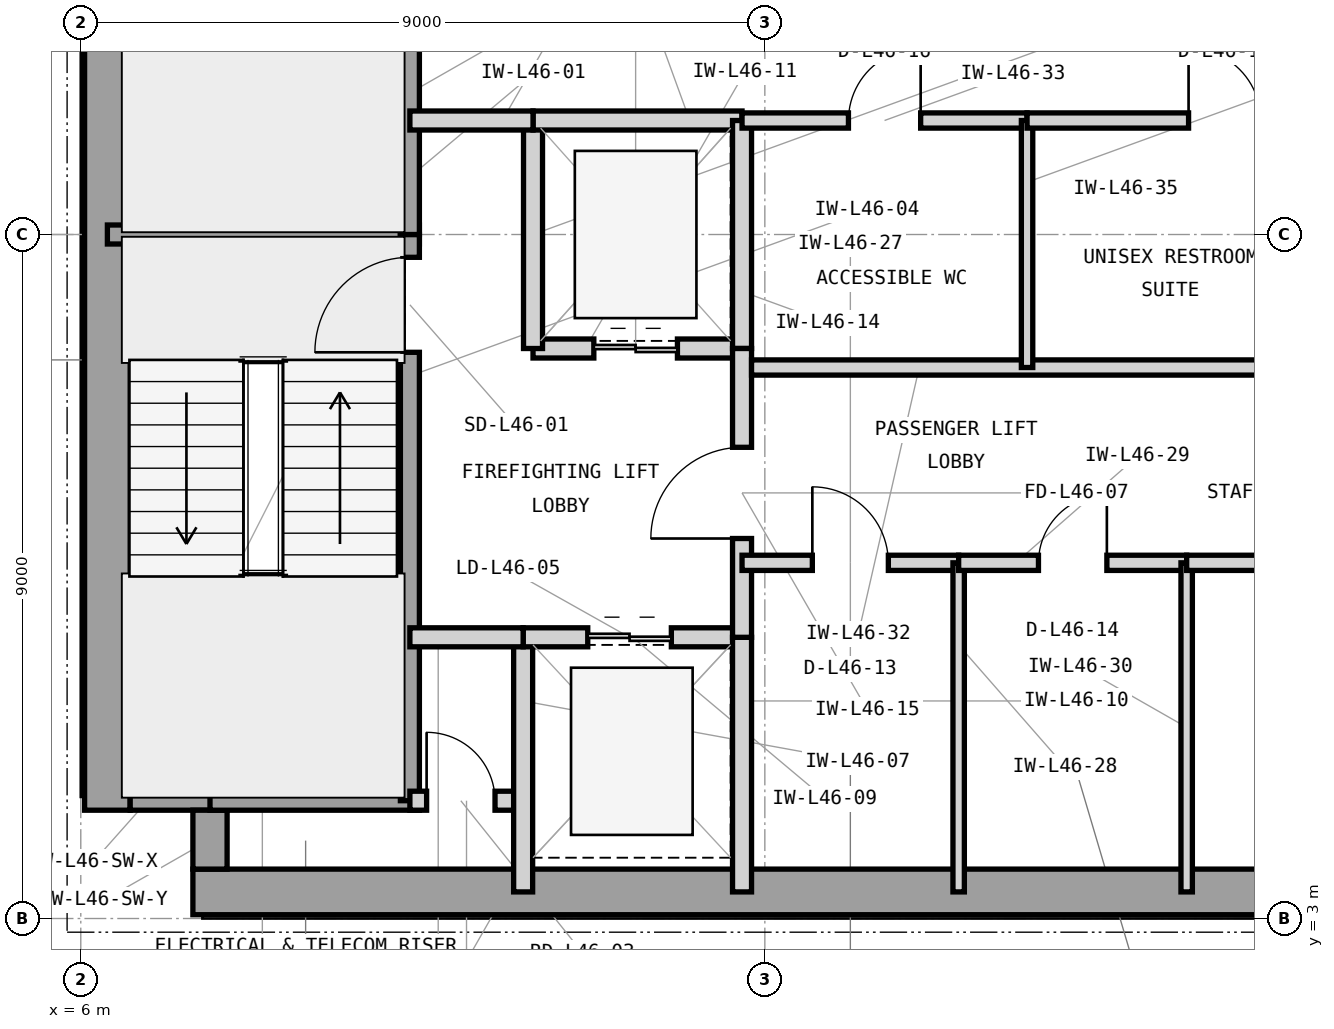
"""IFC4 building model, lengths in metres.
Left out: names, types, materials, properties, quantities, classifications, styles, units other than length and angle.
Written with IfcOpenShell. Run it as: python <this file> out.ifc"""

import sys

from ifc_helpers import new_model, si_unit, direction, frame, frame_2d, origin, place, context, subcontext, project, spatial, rectangle, extrude, element, fill, save


model = new_model("IFC4")
c1 = context("Model", 3, precision=1e-05, world=origin(), true_north=direction((0.0, 1.0)))
c2 = subcontext(c1, "Body", "Model", "MODEL_VIEW")
j1 = project(units=[si_unit("LENGTHUNIT", "METRE"), si_unit("PLANEANGLEUNIT", "RADIAN")], contexts=[c1])
p1 = place(None, origin())
s1 = spatial("IfcSite", under=j1, at=p1, CompositionType="ELEMENT")
p2 = place(p1, origin())
s2 = spatial("IfcBuilding", under=s1, at=p2, CompositionType="ELEMENT")
p3 = place(p2, frame((0.0, 0.0, 191.7)))
s3 = spatial("IfcBuildingStorey", under=s2, at=p3, CompositionType="ELEMENT", Elevation=191.7)
p4 = place(p3, frame((7.475, 3.35, 0.0), z_axis=(0.0, 0.0, 1.0), x_axis=(1.0, 0.0, 0.0)))
e1 = element("IfcWall", 1, at=p4, inside=s3, PredefinedType="SHEAR", context=c2, shape_type="SweptSolid", body=[
    extrude(rectangle(XDim=16.475, YDim=0.6, at=frame_2d((8.237, 0.0))), origin(), (0.0, 0.0, 1.0), 3.9),
])
p5 = place(p3, frame((6.35, 4.425, 0.0), z_axis=(0.0, 0.0, 1.0), x_axis=(0.0, 1.0, 0.0)))
e2 = element("IfcWall", 2, at=p5, inside=s3, PredefinedType="SHEAR", context=c2, shape_type="SweptSolid", body=[
    extrude(rectangle(XDim=15.15, YDim=0.6, at=frame_2d((7.575, 0.0))), origin(), (0.0, 0.0, 1.0), 3.9),
])
p6 = place(p3, frame((6.65, 4.65, 0.0), z_axis=(0.0, 0.0, 1.0), x_axis=(1.0, 0.0, 0.0)))
e3 = element("IfcWall", 3, at=p6, inside=s3, PredefinedType="SHEAR", context=c2, shape_type="SweptSolid", body=[
    extrude(rectangle(XDim=1.275, YDim=0.45, at=frame_2d((0.638, 0.0))), origin(), (0.0, 0.0, 1.0), 3.9),
])
p7 = place(p3, frame((7.7, 3.65, 0.0), z_axis=(0.0, 0.0, 1.0), x_axis=(0.0, 1.0, 0.0)))
e4 = element("IfcWall", 4, at=p7, inside=s3, PredefinedType="SHEAR", context=c2, shape_type="SweptSolid", body=[
    extrude(rectangle(XDim=0.775, YDim=0.45, at=frame_2d((0.388, 0.0))), origin(), (0.0, 0.0, 1.0), 3.9),
])
p8 = place(p3, frame((6.35, 12.0, 0.0), z_axis=(0.0, 0.0, 1.0), x_axis=(1.0, 0.0, 0.0)))
e5 = element("IfcWall", 5, at=p8, inside=s3, PredefinedType="SHEAR", context=c2, shape_type="SweptSolid", body=[
    extrude(rectangle(XDim=4.105, YDim=0.25, at=frame_2d((2.052, 0.0))), origin(), (0.0, 0.0, 1.0), 3.9),
])
p9 = place(p3, frame((7.7, 4.55, 0.0), z_axis=(0.0, 0.0, 1.0), x_axis=(1.0, 0.0, 0.0)))
e6 = element("IfcWall", 6, at=p9, inside=s3, PredefinedType="SHEAR", context=c2, shape_type="SweptSolid", body=[
    extrude(rectangle(XDim=2.755, YDim=0.25, at=frame_2d((1.377, 0.0))), origin(), (0.0, 0.0, 1.0), 3.9),
])
p10 = place(p3, frame((10.33, 4.55, 0.0), z_axis=(0.0, 0.0, 1.0), x_axis=(0.0, 1.0, 0.0)))
e7 = element("IfcWall", 7, at=p10, inside=s3, PredefinedType="SHEAR", context=c2, shape_type="SweptSolid", body=[
    extrude(rectangle(XDim=7.45, YDim=0.25, at=frame_2d((3.725, 0.0))), origin(), (0.0, 0.0, 1.0), 3.9),
])
p11 = place(p10, frame((5.9, 0.0, 0.0)))
e8 = element("IfcOpeningElement", 8, at=p11, cuts=e7, PredefinedType="OPENING", context=c2, shape_type="SweptSolid", body=[
    extrude(rectangle(XDim=1.25, YDim=2.2, at=frame_2d((0.625, 1.1))), frame((0.0, 0.135, 0.0), z_axis=(0.0, -1.0, 0.0), x_axis=(1.0, 0.0, 0.0)), (0.0, 0.0, 1.0), 0.27),
])
p12 = place(p3, frame((10.33, 12.0, 0.0), z_axis=(0.0, 0.0, 1.0), x_axis=(0.0, 1.0, 0.0)))
e9 = element("IfcWall", 9, at=p12, inside=s3, PredefinedType="SHEAR", context=c2, shape_type="SweptSolid", body=[
    extrude(rectangle(XDim=7.45, YDim=0.25, at=frame_2d((3.725, 0.0))), origin(), (0.0, 0.0, 1.0), 3.9),
])
p13 = place(p12, frame((5.85, 0.0, 0.0)))
e10 = element("IfcOpeningElement", 10, at=p13, cuts=e9, PredefinedType="OPENING", context=c2, shape_type="SweptSolid", body=[
    extrude(rectangle(XDim=1.25, YDim=2.2, at=frame_2d((0.625, 1.1))), frame((0.0, 0.135, 0.0), z_axis=(0.0, -1.0, 0.0), x_axis=(1.0, 0.0, 0.0)), (0.0, 0.0, 1.0), 0.27),
])
p14 = place(p3, frame((10.33, 4.55, 0.0), z_axis=(0.0, 0.0, 1.0), x_axis=(1.0, 0.0, 0.0)))
e11 = element("IfcWall", 11, at=p14, inside=s3, PredefinedType="PARTITIONING", context=c2, shape_type="SweptSolid", body=[
    extrude(rectangle(XDim=1.49, YDim=0.25, at=frame_2d((0.745, 0.0))), origin(), (0.0, 0.0, 1.0), 3.69),
])
p15 = place(p14, frame((0.22, 0.0, 0.0)))
e12 = element("IfcOpeningElement", 12, at=p15, cuts=e11, PredefinedType="OPENING", context=c2, shape_type="SweptSolid", body=[
    extrude(rectangle(XDim=0.9, YDim=2.1, at=frame_2d((0.45, 1.05))), frame((0.0, 0.135, 0.0), z_axis=(0.0, -1.0, 0.0), x_axis=(1.0, 0.0, 0.0)), (0.0, 0.0, 1.0), 0.27),
])
p16 = place(p3, frame((11.82, 3.35, 0.0), z_axis=(0.0, 0.0, 1.0), x_axis=(0.0, 1.0, 0.0)))
e13 = element("IfcWall", 13, at=p16, inside=s3, PredefinedType="PARTITIONING", context=c2, shape_type="SweptSolid", body=[
    extrude(rectangle(XDim=3.35, YDim=0.25, at=frame_2d((1.675, 0.0))), origin(), (0.0, 0.0, 1.0), 3.69),
])
p17 = place(p3, frame((11.82, 6.7, 0.0), z_axis=(0.0, 0.0, 1.0), x_axis=(1.0, 0.0, 0.0)))
e14 = element("IfcWall", 14, at=p17, inside=s3, PredefinedType="PARTITIONING", context=c2, shape_type="SweptSolid", body=[
    extrude(rectangle(XDim=2.88, YDim=0.25, at=frame_2d((1.44, 0.0))), origin(), (0.0, 0.0, 1.0), 3.283),
])
p18 = place(p17, frame((0.85, 0.0, 0.0)))
e15 = element("IfcOpeningElement", 15, at=p18, cuts=e14, PredefinedType="OPENING", context=c2, shape_type="SweptSolid", body=[
    extrude(rectangle(XDim=1.1, YDim=2.25, at=frame_2d((0.55, 1.125))), frame((0.0, 0.135, 0.0), z_axis=(0.0, -1.0, 0.0), x_axis=(1.0, 0.0, 0.0)), (0.0, 0.0, 1.0), 0.27),
])
p19 = place(p3, frame((14.7, 3.35, 0.0), z_axis=(0.0, 0.0, 1.0), x_axis=(0.0, 1.0, 0.0)))
e16 = element("IfcWall", 16, at=p19, inside=s3, PredefinedType="PARTITIONING", context=c2, shape_type="SweptSolid", body=[
    extrude(rectangle(XDim=3.35, YDim=0.25, at=frame_2d((1.675, 0.0))), origin(), (0.0, 0.0, 1.0), 3.69),
])
p20 = place(p3, frame((11.95, 10.5, 0.0), z_axis=(0.0, 0.0, 1.0), x_axis=(1.0, 0.0, 0.0)))
e17 = element("IfcWall", 17, at=p20, inside=s3, PredefinedType="PARTITIONING", context=c2, shape_type="SweptSolid", body=[
    extrude(rectangle(XDim=2.75, YDim=0.25, at=frame_2d((1.375, 0.0))), origin(), (0.0, 0.0, 1.0), 3.283),
])
p21 = place(p20, frame((0.8, 0.0, 0.0)))
e18 = element("IfcOpeningElement", 18, at=p21, cuts=e17, PredefinedType="OPENING", context=c2, shape_type="SweptSolid", body=[
    extrude(rectangle(XDim=1.1, YDim=2.25, at=frame_2d((0.55, 1.125))), frame((0.0, 0.135, 0.0), z_axis=(0.0, -1.0, 0.0), x_axis=(1.0, 0.0, 0.0)), (0.0, 0.0, 1.0), 0.27),
])
p22 = place(p3, frame((11.95, 10.5, 0.0), z_axis=(0.0, 0.0, 1.0), x_axis=(0.0, 1.0, 0.0)))
e19 = element("IfcWall", 19, at=p22, inside=s3, PredefinedType="PARTITIONING", context=c2, shape_type="SweptSolid", body=[
    extrude(rectangle(XDim=3.0, YDim=0.25, at=frame_2d((1.5, 0.0))), origin(), (0.0, 0.0, 1.0), 3.69),
])
p23 = place(p3, frame((11.95, 13.5, 0.0), z_axis=(0.0, 0.0, 1.0), x_axis=(1.0, 0.0, 0.0)))
e20 = element("IfcWall", 20, at=p23, inside=s3, PredefinedType="PARTITIONING", context=c2, shape_type="SweptSolid", body=[
    extrude(rectangle(XDim=2.75, YDim=0.25, at=frame_2d((1.375, 0.0))), origin(), (0.0, 0.0, 1.0), 3.283),
])
p24 = place(p3, frame((14.7, 10.5, 0.0), z_axis=(0.0, 0.0, 1.0), x_axis=(0.0, 1.0, 0.0)))
e21 = element("IfcWall", 21, at=p24, inside=s3, PredefinedType="PARTITIONING", context=c2, shape_type="SweptSolid", body=[
    extrude(rectangle(XDim=3.0, YDim=0.25, at=frame_2d((1.5, 0.0))), origin(), (0.0, 0.0, 1.0), 3.69),
])
p25 = place(p3, frame((14.7, 6.7, 0.0), z_axis=(0.0, 0.0, 1.0), x_axis=(0.0, 1.0, 0.0)))
e22 = element("IfcWall", 22, at=p25, inside=s3, PredefinedType="PARTITIONING", context=c2, shape_type="SweptSolid", body=[
    extrude(rectangle(XDim=3.8, YDim=0.25, at=frame_2d((1.9, 0.0))), origin(), (0.0, 0.0, 1.0), 3.69),
])
p26 = place(p25, frame((1.3, 0.0, 0.0)))
e23 = element("IfcOpeningElement", 23, at=p26, cuts=e22, PredefinedType="OPENING", context=c2, shape_type="SweptSolid", body=[
    extrude(rectangle(XDim=1.2, YDim=2.2, at=frame_2d((0.6, 1.1))), frame((0.0, 0.135, 0.0), z_axis=(0.0, -1.0, 0.0), x_axis=(1.0, 0.0, 0.0)), (0.0, 0.0, 1.0), 0.27),
])
p27 = place(p3, frame((10.33, 13.5, 0.0), z_axis=(0.0, 0.0, 1.0), x_axis=(1.0, 0.0, 0.0)))
e24 = element("IfcWall", 24, at=p27, inside=s3, PredefinedType="PARTITIONING", context=c2, shape_type="SweptSolid", body=[
    extrude(rectangle(XDim=1.62, YDim=0.25, at=frame_2d((0.81, 0.0))), origin(), (0.0, 0.0, 1.0), 3.283),
])
p28 = place(p3, frame((10.33, 6.7, 0.0), z_axis=(0.0, 0.0, 1.0), x_axis=(1.0, 0.0, 0.0)))
e25 = element("IfcWall", 25, at=p28, inside=s3, PredefinedType="PARTITIONING", context=c2, shape_type="SweptSolid", body=[
    extrude(rectangle(XDim=1.49, YDim=0.25, at=frame_2d((0.745, 0.0))), origin(), (0.0, 0.0, 1.0), 3.283),
])
p29 = place(p3, frame((14.7, 7.68, 0.0), z_axis=(0.0, 0.0, 1.0), x_axis=(1.0, 0.0, 0.0)))
e26 = element("IfcWall", 26, at=p29, inside=s3, PredefinedType="PARTITIONING", context=c2, shape_type="SweptSolid", body=[
    extrude(rectangle(XDim=2.85, YDim=0.2, at=frame_2d((1.425, 0.0))), origin(), (0.0, 0.0, 1.0), 3.69),
])
p30 = place(p29, frame((0.925, 0.0, 0.0)))
e27 = element("IfcOpeningElement", 27, at=p30, cuts=e26, PredefinedType="OPENING", context=c2, shape_type="SweptSolid", body=[
    extrude(rectangle(XDim=1.0, YDim=2.15, at=frame_2d((0.5, 1.075))), frame((0.0, 0.11, 0.0), z_axis=(0.0, -1.0, 0.0), x_axis=(1.0, 0.0, 0.0)), (0.0, 0.0, 1.0), 0.22),
])
p31 = place(p3, frame((17.55, 3.35, 0.0), z_axis=(0.0, 0.0, 1.0), x_axis=(0.0, 1.0, 0.0)))
e28 = element("IfcWall", 28, at=p31, inside=s3, PredefinedType="PARTITIONING", context=c2, shape_type="SweptSolid", body=[
    extrude(rectangle(XDim=4.33, YDim=0.15, at=frame_2d((2.165, 0.0))), origin(), (0.0, 0.0, 1.0), 3.69),
])
p32 = place(p3, frame((17.55, 7.68, 0.0), z_axis=(0.0, 0.0, 1.0), x_axis=(1.0, 0.0, 0.0)))
e29 = element("IfcWall", 29, at=p32, inside=s3, PredefinedType="PARTITIONING", context=c2, shape_type="SweptSolid", body=[
    extrude(rectangle(XDim=3.0, YDim=0.2, at=frame_2d((1.5, 0.0))), origin(), (0.0, 0.0, 1.0), 3.69),
])
p33 = place(p32, frame((1.05, 0.0, 0.0)))
e30 = element("IfcOpeningElement", 30, at=p33, cuts=e29, PredefinedType="OPENING", context=c2, shape_type="SweptSolid", body=[
    extrude(rectangle(XDim=0.9, YDim=2.1, at=frame_2d((0.45, 1.05))), frame((0.0, 0.11, 0.0), z_axis=(0.0, -1.0, 0.0), x_axis=(1.0, 0.0, 0.0)), (0.0, 0.0, 1.0), 0.22),
])
p34 = place(p3, frame((20.55, 3.35, 0.0), z_axis=(0.0, 0.0, 1.0), x_axis=(0.0, 1.0, 0.0)))
e31 = element("IfcWall", 31, at=p34, inside=s3, PredefinedType="PARTITIONING", context=c2, shape_type="SweptSolid", body=[
    extrude(rectangle(XDim=4.33, YDim=0.15, at=frame_2d((2.165, 0.0))), origin(), (0.0, 0.0, 1.0), 3.69),
])
p35 = place(p3, frame((20.55, 7.68, 0.0), z_axis=(0.0, 0.0, 1.0), x_axis=(1.0, 0.0, 0.0)))
e32 = element("IfcWall", 32, at=p35, inside=s3, PredefinedType="PARTITIONING", context=c2, shape_type="SweptSolid", body=[
    extrude(rectangle(XDim=3.1, YDim=0.2, at=frame_2d((1.55, 0.0))), origin(), (0.0, 0.0, 1.0), 3.69),
])
p36 = place(p35, frame((1.075, 0.0, 0.0)))
e33 = element("IfcOpeningElement", 33, at=p36, cuts=e32, PredefinedType="OPENING", context=c2, shape_type="SweptSolid", body=[
    extrude(rectangle(XDim=0.95, YDim=2.1, at=frame_2d((0.475, 1.05))), frame((0.0, 0.11, 0.0), z_axis=(0.0, -1.0, 0.0), x_axis=(1.0, 0.0, 0.0)), (0.0, 0.0, 1.0), 0.22),
])
p37 = place(p3, frame((14.825, 10.25, 0.0), z_axis=(0.0, 0.0, 1.0), x_axis=(1.0, 0.0, 0.0)))
e34 = element("IfcWall", 34, at=p37, inside=s3, PredefinedType="PARTITIONING", context=c2, shape_type="SweptSolid", body=[
    extrude(rectangle(XDim=8.825, YDim=0.2, at=frame_2d((4.413, 0.0))), origin(), (0.0, 0.0, 1.0), 3.69),
])
p38 = place(p3, frame((14.7, 13.5, 0.0), z_axis=(0.0, 0.0, 1.0), x_axis=(1.0, 0.0, 0.0)))
e35 = element("IfcWall", 35, at=p38, inside=s3, PredefinedType="PARTITIONING", context=c2, shape_type="SweptSolid", body=[
    extrude(rectangle(XDim=3.75, YDim=0.2, at=frame_2d((1.875, 0.0))), origin(), (0.0, 0.0, 1.0), 3.283),
])
p39 = place(p38, frame((1.4, 0.0, 0.0)))
e36 = element("IfcOpeningElement", 36, at=p39, cuts=e35, PredefinedType="OPENING", context=c2, shape_type="SweptSolid", body=[
    extrude(rectangle(XDim=0.95, YDim=2.1, at=frame_2d((0.475, 1.05))), frame((0.0, 0.11, 0.0), z_axis=(0.0, -1.0, 0.0), x_axis=(1.0, 0.0, 0.0)), (0.0, 0.0, 1.0), 0.22),
])
p40 = place(p3, frame((18.45, 10.25, 0.0), z_axis=(0.0, 0.0, 1.0), x_axis=(0.0, 1.0, 0.0)))
e37 = element("IfcWall", 37, at=p40, inside=s3, PredefinedType="PARTITIONING", context=c2, shape_type="SweptSolid", body=[
    extrude(rectangle(XDim=3.25, YDim=0.15, at=frame_2d((1.625, 0.0))), origin(), (0.0, 0.0, 1.0), 3.69),
])
p41 = place(p3, frame((18.45, 13.5, 0.0), z_axis=(0.0, 0.0, 1.0), x_axis=(1.0, 0.0, 0.0)))
e38 = element("IfcWall", 38, at=p41, inside=s3, PredefinedType="PARTITIONING", context=c2, shape_type="SweptSolid", body=[
    extrude(rectangle(XDim=5.2, YDim=0.2, at=frame_2d((2.6, 0.0))), origin(), (0.0, 0.0, 1.0), 3.283),
])
p42 = place(p41, frame((2.125, 0.0, 0.0)))
e39 = element("IfcOpeningElement", 39, at=p42, cuts=e38, PredefinedType="OPENING", context=c2, shape_type="SweptSolid", body=[
    extrude(rectangle(XDim=0.95, YDim=2.1, at=frame_2d((0.475, 1.05))), frame((0.0, 0.11, 0.0), z_axis=(0.0, -1.0, 0.0), x_axis=(1.0, 0.0, 0.0)), (0.0, 0.0, 1.0), 0.22),
])
p43 = place(p11, origin())
e40 = element("IfcDoor", 40, at=p43, inside=s3, OperationType="SINGLE_SWING_LEFT", PredefinedType="DOOR", context=c2, shape_type="SweptSolid", body=[
    extrude(rectangle(XDim=1.25, YDim=2.2, at=frame_2d((0.625, 1.1))), frame((0.0, 0.025, 0.0), z_axis=(0.0, -1.0, 0.0), x_axis=(1.0, 0.0, 0.0)), (0.0, 0.0, 1.0), 0.05),
])
fill(e8, e40)
p44 = place(p15, origin())
e41 = element("IfcDoor", 41, at=p44, inside=s3, OperationType="SINGLE_SWING_LEFT", PredefinedType="TRAPDOOR", context=c2, shape_type="SweptSolid", body=[
    extrude(rectangle(XDim=0.9, YDim=2.1, at=frame_2d((0.45, 1.05))), frame((0.0, 0.025, 0.0), z_axis=(0.0, -1.0, 0.0), x_axis=(1.0, 0.0, 0.0)), (0.0, 0.0, 1.0), 0.05),
])
fill(e12, e41)
p45 = place(p18, origin())
e42 = element("IfcDoor", 42, at=p45, inside=s3, OperationType="DOUBLE_DOOR_SLIDING", PredefinedType="DOOR", context=c2, shape_type="SweptSolid", body=[
    extrude(rectangle(XDim=1.1, YDim=2.25, at=frame_2d((0.55, 1.125))), frame((0.0, 0.025, 0.0), z_axis=(0.0, -1.0, 0.0), x_axis=(1.0, 0.0, 0.0)), (0.0, 0.0, 1.0), 0.05),
])
fill(e15, e42)
p46 = place(p21, origin())
e43 = element("IfcDoor", 43, at=p46, inside=s3, OperationType="DOUBLE_DOOR_SLIDING", PredefinedType="DOOR", context=c2, shape_type="SweptSolid", body=[
    extrude(rectangle(XDim=1.1, YDim=2.25, at=frame_2d((0.55, 1.125))), frame((0.0, 0.025, 0.0), z_axis=(0.0, -1.0, 0.0), x_axis=(1.0, 0.0, 0.0)), (0.0, 0.0, 1.0), 0.05),
])
fill(e18, e43)
p47 = place(p26, origin())
e44 = element("IfcDoor", 44, at=p47, inside=s3, OperationType="SINGLE_SWING_LEFT", PredefinedType="DOOR", context=c2, shape_type="SweptSolid", body=[
    extrude(rectangle(XDim=1.2, YDim=2.2, at=frame_2d((0.6, 1.1))), frame((0.0, 0.025, 0.0), z_axis=(0.0, -1.0, 0.0), x_axis=(1.0, 0.0, 0.0)), (0.0, 0.0, 1.0), 0.05),
])
fill(e23, e44)
p48 = place(p30, origin())
e45 = element("IfcDoor", 45, at=p48, inside=s3, OperationType="SINGLE_SWING_LEFT", PredefinedType="DOOR", context=c2, shape_type="SweptSolid", body=[
    extrude(rectangle(XDim=1.0, YDim=2.15, at=frame_2d((0.5, 1.075))), frame((0.0, 0.025, 0.0), z_axis=(0.0, -1.0, 0.0), x_axis=(1.0, 0.0, 0.0)), (0.0, 0.0, 1.0), 0.05),
])
fill(e27, e45)
p49 = place(p33, origin())
e46 = element("IfcDoor", 46, at=p49, inside=s3, OperationType="SINGLE_SWING_RIGHT", PredefinedType="TRAPDOOR", context=c2, shape_type="SweptSolid", body=[
    extrude(rectangle(XDim=0.9, YDim=2.1, at=frame_2d((0.45, 1.05))), frame((0.0, 0.025, 0.0), z_axis=(0.0, -1.0, 0.0), x_axis=(1.0, 0.0, 0.0)), (0.0, 0.0, 1.0), 0.05),
])
fill(e30, e46)
p50 = place(p39, origin())
e47 = element("IfcDoor", 47, at=p50, inside=s3, OperationType="SINGLE_SWING_RIGHT", PredefinedType="DOOR", context=c2, shape_type="SweptSolid", body=[
    extrude(rectangle(XDim=0.95, YDim=2.1, at=frame_2d((0.475, 1.05))), frame((0.0, 0.025, 0.0), z_axis=(0.0, -1.0, 0.0), x_axis=(1.0, 0.0, 0.0)), (0.0, 0.0, 1.0), 0.05),
])
fill(e36, e47)
p51 = place(p42, origin())
e48 = element("IfcDoor", 48, at=p51, inside=s3, OperationType="SINGLE_SWING_LEFT", PredefinedType="DOOR", context=c2, shape_type="SweptSolid", body=[
    extrude(rectangle(XDim=0.95, YDim=2.1, at=frame_2d((0.475, 1.05))), frame((0.0, 0.025, 0.0), z_axis=(0.0, -1.0, 0.0), x_axis=(1.0, 0.0, 0.0)), (0.0, 0.0, 1.0), 0.05),
])
fill(e39, e48)
save(model, sys.argv[1])
